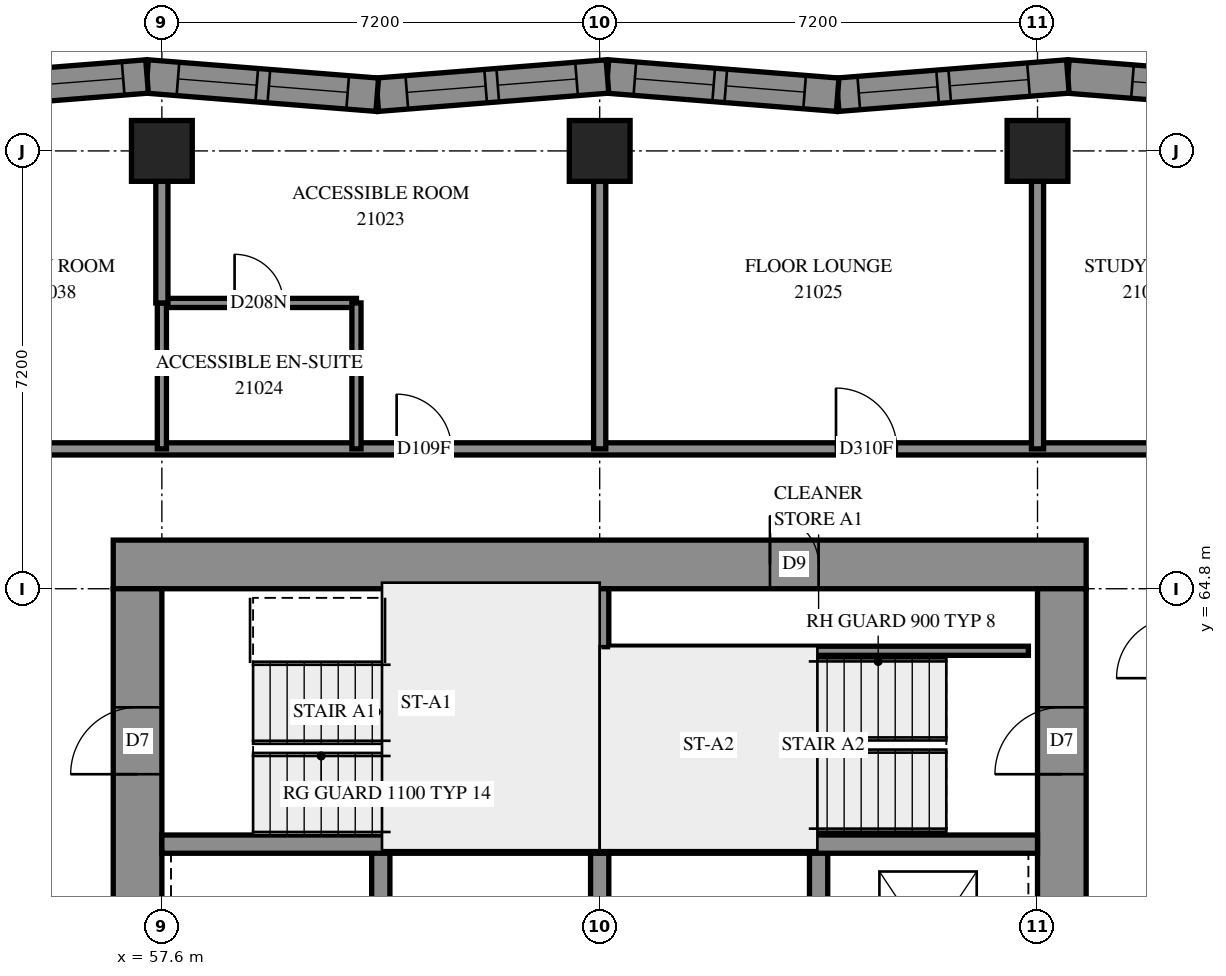
"""IFC4 building model, lengths in metres.
Left out: names, types, materials, properties, quantities, classifications, styles, units other than length and angle.
Written with IfcOpenShell. Run it as: python <this file> out.ifc"""

import sys

from ifc_helpers import new_model, si_unit, direction, frame, frame_2d, origin, origin_2d, place, context, subcontext, project, spatial, polyline, rectangle, outline, extrude, element, fill, save


model = new_model("IFC4")
c1 = context("Model", 3, precision=1e-05, world=origin(), true_north=direction((0.0, 1.0)))
c2 = subcontext(c1, "Body", "Model", "MODEL_VIEW")
j1 = project(units=[si_unit("LENGTHUNIT", "METRE"), si_unit("PLANEANGLEUNIT", "RADIAN")], contexts=[c1])
p1 = place(None, origin())
s1 = spatial("IfcSite", under=j1, at=p1, CompositionType="ELEMENT")
p2 = place(p1, origin())
s2 = spatial("IfcBuilding", under=s1, at=p2, CompositionType="ELEMENT")
p3 = place(p2, frame((0.0, 0.0, 81.2)))
s3 = spatial("IfcBuildingStorey", under=s2, at=p3, CompositionType="ELEMENT", Elevation=81.2)
for number, where, z_axis, x_axis in (
    (1, (57.6, 72.0, 0.0), (0.0, 0.0, 1.0), (1.0, 0.0, 0.0)),
    (2, (64.8, 72.0, 0.0), (0.0, 0.0, 1.0), (1.0, 0.0, 0.0)),
    (3, (72.0, 72.0, 0.0), (0.0, 0.0, 1.0), (1.0, 0.0, 0.0)),
):
    element("IfcColumn", number, at=place(p3, frame(where, z_axis=z_axis, x_axis=x_axis)), inside=s3, PredefinedType="COLUMN", context=c2, shape_type="SweptSolid", body=[
        extrude(rectangle(XDim=1.0, YDim=1.0, at=origin_2d()), origin(), (0.0, 0.0, 1.0), 3.1),
    ])
p4 = place(p3, frame((56.8, 65.2, -0.3), z_axis=(0.0, 0.0, 1.0), x_axis=(1.0, 0.0, 0.0)))
e4 = element("IfcWall", 4, at=p4, inside=s3, PredefinedType="SHEAR", context=c2, shape_type="SweptSolid", body=[
    extrude(rectangle(XDim=16.0, YDim=0.8, at=frame_2d((8.0, 0.0))), origin(), (0.0, 0.0, 1.0), 2.7),
])
p5 = place(p4, frame((10.8, 0.0, 0.3)))
e5 = element("IfcOpeningElement", 5, at=p5, cuts=e4, PredefinedType="OPENING", context=c2, shape_type="SweptSolid", body=[
    extrude(rectangle(XDim=0.8, YDim=2.1, at=frame_2d((0.4, 1.05))), frame((0.0, 0.41, 0.0), z_axis=(0.0, -1.0, 0.0), x_axis=(1.0, 0.0, 0.0)), (0.0, 0.0, 1.0), 0.82),
])
p6 = place(p3, frame((57.2, 50.4, -0.3), z_axis=(0.0, 0.0, 1.0), x_axis=(0.0, 1.0, 0.0)))
e6 = element("IfcWall", 6, at=p6, inside=s3, PredefinedType="SHEAR", context=c2, shape_type="SweptSolid", body=[
    extrude(rectangle(XDim=14.4, YDim=0.8, at=frame_2d((7.2, 0.0))), origin(), (0.0, 0.0, 1.0), 2.7),
])
p7 = place(p6, frame((4.55, 0.0, 0.3)))
e7 = element("IfcOpeningElement", 7, at=p7, cuts=e6, PredefinedType="OPENING", context=c2, shape_type="SweptSolid", body=[
    extrude(rectangle(XDim=1.1, YDim=2.1, at=frame_2d((0.55, 1.05))), frame((0.0, 0.41, 0.0), z_axis=(0.0, -1.0, 0.0), x_axis=(1.0, 0.0, 0.0)), (0.0, 0.0, 1.0), 0.82),
])
p8 = place(p6, frame((11.35, 0.0, 0.3)))
e8 = element("IfcOpeningElement", 8, at=p8, cuts=e6, PredefinedType="OPENING", context=c2, shape_type="SweptSolid", body=[
    extrude(rectangle(XDim=1.1, YDim=2.1, at=frame_2d((0.55, 1.05))), frame((0.0, 0.41, 0.0), z_axis=(0.0, -1.0, 0.0), x_axis=(1.0, 0.0, 0.0)), (0.0, 0.0, 1.0), 0.82),
])
p9 = place(p3, frame((72.4, 50.4, -0.3), z_axis=(0.0, 0.0, 1.0), x_axis=(0.0, 1.0, 0.0)))
e9 = element("IfcWall", 9, at=p9, inside=s3, PredefinedType="SHEAR", context=c2, shape_type="SweptSolid", body=[
    extrude(rectangle(XDim=14.4, YDim=0.8, at=frame_2d((7.2, 0.0))), origin(), (0.0, 0.0, 1.0), 2.7),
])
p10 = place(p9, frame((4.55, 0.0, 0.3)))
e10 = element("IfcOpeningElement", 10, at=p10, cuts=e9, PredefinedType="OPENING", context=c2, shape_type="SweptSolid", body=[
    extrude(rectangle(XDim=1.1, YDim=2.1, at=frame_2d((0.55, 1.05))), frame((0.0, 0.41, 0.0), z_axis=(0.0, -1.0, 0.0), x_axis=(1.0, 0.0, 0.0)), (0.0, 0.0, 1.0), 0.82),
])
p11 = place(p9, frame((11.35, 0.0, 0.3)))
e11 = element("IfcOpeningElement", 11, at=p11, cuts=e9, PredefinedType="OPENING", context=c2, shape_type="SweptSolid", body=[
    extrude(rectangle(XDim=1.1, YDim=2.1, at=frame_2d((0.55, 1.05))), frame((0.0, 0.41, 0.0), z_axis=(0.0, -1.0, 0.0), x_axis=(1.0, 0.0, 0.0)), (0.0, 0.0, 1.0), 0.82),
])
for number, where, z_axis, x_axis in (
    (12, (61.2, 57.3, 0.0), (0.0, 0.0, 1.0), (0.0, 1.0, 0.0)),
    (13, (64.8, 57.3, 0.0), (0.0, 0.0, 1.0), (0.0, 1.0, 0.0)),
    (14, (68.4, 57.3, 0.0), (0.0, 0.0, 1.0), (0.0, 1.0, 0.0)),
):
    element("IfcWall", number, at=place(p3, frame(where, z_axis=z_axis, x_axis=x_axis)), inside=s3, PredefinedType="SOLIDWALL", context=c2, shape_type="SweptSolid", body=[
        extrude(rectangle(XDim=3.3, YDim=0.3, at=frame_2d((1.65, 0.0))), origin(), (0.0, 0.0, 1.0), 3.1),
    ])
for number, where, z_axis, x_axis in (
    (15, (57.6, 60.6, 0.0), (0.0, 0.0, 1.0), (1.0, 0.0, 0.0)),
    (16, (64.8, 60.6, 0.0), (0.0, 0.0, 1.0), (1.0, 0.0, 0.0)),
):
    element("IfcWall", number, at=place(p3, frame(where, z_axis=z_axis, x_axis=x_axis)), inside=s3, PredefinedType="SOLIDWALL", context=c2, shape_type="SweptSolid", body=[
        extrude(rectangle(XDim=7.2, YDim=0.3, at=frame_2d((3.6, 0.0))), origin(), (0.0, 0.0, 1.0), 3.1),
    ])
p12 = place(p3, frame((64.8, 60.6, 0.0), z_axis=(0.0, 0.0, 1.0), x_axis=(0.0, 1.0, 0.0)))
e17 = element("IfcWall", 17, at=p12, inside=s3, PredefinedType="SOLIDWALL", context=c2, shape_type="SweptSolid", body=[
    extrude(rectangle(XDim=4.2, YDim=0.3, at=frame_2d((2.1, 0.0))), origin(), (0.0, 0.0, 1.0), 3.1),
])
p13 = place(p3, frame((76.306, 72.922, 0.0), z_axis=(0.0, 0.0, 1.0), x_axis=(-0.9968745318, 0.0790010628, 0.0)))
e18 = element("IfcWall", 18, at=p13, inside=s3, PredefinedType="SOLIDWALL", context=c2, shape_type="SweptSolid", body=[
    extrude(outline(polyline([(0.043, -0.275), (3.841, -0.275), (3.797, 0.275), (-0.043, 0.275), (0.043, -0.275)])), origin(), (0.0, 0.0, 1.0), 3.1),
])
p14 = place(p13, frame((1.553, 0.0, 0.5)))
e19 = element("IfcOpeningElement", 19, at=p14, cuts=e18, PredefinedType="OPENING", context=c2, shape_type="SweptSolid", body=[
    extrude(rectangle(XDim=1.2, YDim=2.45, at=frame_2d((0.6, 1.225))), frame((0.0, 0.285, 0.0), z_axis=(0.0, -1.0, 0.0), x_axis=(1.0, 0.0, 0.0)), (0.0, 0.0, 1.0), 0.57),
])
p15 = place(p3, frame((72.499, 73.224, 0.0), z_axis=(0.0, 0.0, 1.0), x_axis=(-0.9968747806, -0.0789979222, 0.0)))
e20 = element("IfcWall", 20, at=p15, inside=s3, PredefinedType="SOLIDWALL", context=c2, shape_type="SweptSolid", body=[
    extrude(outline(polyline([(-0.022, -0.275), (3.776, -0.275), (3.819, 0.275), (0.022, 0.275), (-0.022, -0.275)])), origin(), (0.0, 0.0, 1.0), 3.1),
])
p16 = place(p15, frame((0.649, 0.0, 0.5)))
e21 = element("IfcOpeningElement", 21, at=p16, cuts=e20, PredefinedType="OPENING", context=c2, shape_type="SweptSolid", body=[
    extrude(rectangle(XDim=1.3, YDim=2.45, at=frame_2d((0.65, 1.225))), frame((0.0, 0.285, 0.0), z_axis=(0.0, -1.0, 0.0), x_axis=(1.0, 0.0, 0.0)), (0.0, 0.0, 1.0), 0.57),
])
p17 = place(p15, frame((2.149, 0.0, 0.5)))
e22 = element("IfcOpeningElement", 22, at=p17, cuts=e20, PredefinedType="OPENING", context=c2, shape_type="SweptSolid", body=[
    extrude(rectangle(XDim=1.3, YDim=2.45, at=frame_2d((0.65, 1.225))), frame((0.0, 0.285, 0.0), z_axis=(0.0, -1.0, 0.0), x_axis=(1.0, 0.0, 0.0)), (0.0, 0.0, 1.0), 0.57),
])
p18 = place(p3, frame((68.713, 72.924, 0.0), z_axis=(0.0, 0.0, 1.0), x_axis=(-0.9968746163, 0.078999996, 0.0)))
e23 = element("IfcWall", 23, at=p18, inside=s3, PredefinedType="SOLIDWALL", context=c2, shape_type="SweptSolid", body=[
    extrude(outline(polyline([(0.022, -0.275), (3.819, -0.275), (3.776, 0.275), (-0.022, 0.275), (0.022, -0.275)])), origin(), (0.0, 0.0, 1.0), 3.1),
])
p19 = place(p18, frame((0.545, 0.0, 0.5)))
e24 = element("IfcOpeningElement", 24, at=p19, cuts=e23, PredefinedType="OPENING", context=c2, shape_type="SweptSolid", body=[
    extrude(rectangle(XDim=1.3, YDim=2.45, at=frame_2d((0.65, 1.225))), frame((0.0, 0.285, 0.0), z_axis=(0.0, -1.0, 0.0), x_axis=(1.0, 0.0, 0.0)), (0.0, 0.0, 1.0), 0.57),
])
p20 = place(p18, frame((2.045, 0.0, 0.5)))
e25 = element("IfcOpeningElement", 25, at=p20, cuts=e23, PredefinedType="OPENING", context=c2, shape_type="SweptSolid", body=[
    extrude(rectangle(XDim=1.3, YDim=2.45, at=frame_2d((0.65, 1.225))), frame((0.0, 0.285, 0.0), z_axis=(0.0, -1.0, 0.0), x_axis=(1.0, 0.0, 0.0)), (0.0, 0.0, 1.0), 0.57),
])
p21 = place(p3, frame((64.927, 73.224, 0.0), z_axis=(0.0, 0.0, 1.0), x_axis=(-0.9968746163, -0.078999996, 0.0)))
e26 = element("IfcWall", 26, at=p21, inside=s3, PredefinedType="SOLIDWALL", context=c2, shape_type="SweptSolid", body=[
    extrude(outline(polyline([(-0.022, -0.275), (3.776, -0.275), (3.819, 0.275), (0.022, 0.275), (-0.022, -0.275)])), origin(), (0.0, 0.0, 1.0), 3.1),
])
p22 = place(p21, frame((0.51, 0.0, 0.5)))
e27 = element("IfcOpeningElement", 27, at=p22, cuts=e26, PredefinedType="OPENING", context=c2, shape_type="SweptSolid", body=[
    extrude(rectangle(XDim=1.3, YDim=2.45, at=frame_2d((0.65, 1.225))), frame((0.0, 0.285, 0.0), z_axis=(0.0, -1.0, 0.0), x_axis=(1.0, 0.0, 0.0)), (0.0, 0.0, 1.0), 0.57),
])
p23 = place(p21, frame((2.01, 0.0, 0.5)))
e28 = element("IfcOpeningElement", 28, at=p23, cuts=e26, PredefinedType="OPENING", context=c2, shape_type="SweptSolid", body=[
    extrude(rectangle(XDim=1.3, YDim=2.45, at=frame_2d((0.65, 1.225))), frame((0.0, 0.285, 0.0), z_axis=(0.0, -1.0, 0.0), x_axis=(1.0, 0.0, 0.0)), (0.0, 0.0, 1.0), 0.57),
])
p24 = place(p3, frame((61.142, 72.924, 0.0), z_axis=(0.0, 0.0, 1.0), x_axis=(-0.9968746163, 0.078999996, 0.0)))
e29 = element("IfcWall", 29, at=p24, inside=s3, PredefinedType="SOLIDWALL", context=c2, shape_type="SweptSolid", body=[
    extrude(outline(polyline([(0.022, -0.275), (3.819, -0.275), (3.776, 0.275), (-0.022, 0.275), (0.022, -0.275)])), origin(), (0.0, 0.0, 1.0), 3.1),
])
p25 = place(p24, frame((0.488, 0.0, 0.5)))
e30 = element("IfcOpeningElement", 30, at=p25, cuts=e29, PredefinedType="OPENING", context=c2, shape_type="SweptSolid", body=[
    extrude(rectangle(XDim=1.3, YDim=2.45, at=frame_2d((0.65, 1.225))), frame((0.0, 0.285, 0.0), z_axis=(0.0, -1.0, 0.0), x_axis=(1.0, 0.0, 0.0)), (0.0, 0.0, 1.0), 0.57),
])
p26 = place(p24, frame((1.988, 0.0, 0.5)))
e31 = element("IfcOpeningElement", 31, at=p26, cuts=e29, PredefinedType="OPENING", context=c2, shape_type="SweptSolid", body=[
    extrude(rectangle(XDim=1.3, YDim=2.45, at=frame_2d((0.65, 1.225))), frame((0.0, 0.285, 0.0), z_axis=(0.0, -1.0, 0.0), x_axis=(1.0, 0.0, 0.0)), (0.0, 0.0, 1.0), 0.57),
])
p27 = place(p3, frame((57.356, 73.224, 0.0), z_axis=(0.0, 0.0, 1.0), x_axis=(-0.9968746163, -0.078999996, 0.0)))
e32 = element("IfcWall", 32, at=p27, inside=s3, PredefinedType="SOLIDWALL", context=c2, shape_type="SweptSolid", body=[
    extrude(outline(polyline([(-0.022, -0.275), (3.776, -0.275), (3.819, 0.275), (0.022, 0.275), (-0.022, -0.275)])), origin(), (0.0, 0.0, 1.0), 3.1),
])
p28 = place(p27, frame((0.394, 0.0, 0.5)))
e33 = element("IfcOpeningElement", 33, at=p28, cuts=e32, PredefinedType="OPENING", context=c2, shape_type="SweptSolid", body=[
    extrude(rectangle(XDim=1.3, YDim=2.45, at=frame_2d((0.65, 1.225))), frame((0.0, 0.285, 0.0), z_axis=(0.0, -1.0, 0.0), x_axis=(1.0, 0.0, 0.0)), (0.0, 0.0, 1.0), 0.57),
])
p29 = place(p27, frame((1.894, 0.0, 0.5)))
e34 = element("IfcOpeningElement", 34, at=p29, cuts=e32, PredefinedType="OPENING", context=c2, shape_type="SweptSolid", body=[
    extrude(rectangle(XDim=1.3, YDim=2.45, at=frame_2d((0.65, 1.225))), frame((0.0, 0.285, 0.0), z_axis=(0.0, -1.0, 0.0), x_axis=(1.0, 0.0, 0.0)), (0.0, 0.0, 1.0), 0.57),
])
p30 = place(p3, frame((64.95, 63.78, 0.0), z_axis=(0.0, 0.0, 1.0), x_axis=(1.0, 0.0, 0.0)))
e35 = element("IfcWall", 35, at=p30, inside=s3, PredefinedType="PARTITIONING", context=c2, shape_type="SweptSolid", body=[
    extrude(rectangle(XDim=6.9, YDim=0.15, at=frame_2d((3.45, 0.0))), origin(), (0.0, 0.0, 1.0), 3.1),
])
p31 = place(p3, frame((55.3, 67.1, 0.0), z_axis=(0.0, 0.0, 1.0), x_axis=(1.0, 0.0, 0.0)))
e36 = element("IfcWall", 36, at=p31, inside=s3, PredefinedType="PARTITIONING", context=c2, shape_type="SweptSolid", body=[
    extrude(rectangle(XDim=19.0, YDim=0.2, at=frame_2d((9.5, 0.0))), origin(), (0.0, 0.0, 1.0), 3.1),
])
p32 = place(p31, frame((6.161, 0.0, 0.0)))
e37 = element("IfcOpeningElement", 37, at=p32, cuts=e36, PredefinedType="OPENING", context=c2, shape_type="SweptSolid", body=[
    extrude(rectangle(XDim=0.9, YDim=2.1, at=frame_2d((0.45, 1.05))), frame((0.0, 0.11, 0.0), z_axis=(0.0, -1.0, 0.0), x_axis=(1.0, 0.0, 0.0)), (0.0, 0.0, 1.0), 0.22),
])
p33 = place(p31, frame((13.386, 0.0, 0.0)))
e38 = element("IfcOpeningElement", 38, at=p33, cuts=e36, PredefinedType="OPENING", context=c2, shape_type="SweptSolid", body=[
    extrude(rectangle(XDim=1.0, YDim=2.1, at=frame_2d((0.5, 1.05))), frame((0.0, 0.11, 0.0), z_axis=(0.0, -1.0, 0.0), x_axis=(1.0, 0.0, 0.0)), (0.0, 0.0, 1.0), 0.22),
])
for number, where, z_axis, x_axis in (
    (39, (64.8, 67.1, 0.0), (0.0, 0.0, 1.0), (0.0, 1.0, 0.0)),
    (40, (72.0, 67.1, 0.0), (0.0, 0.0, 1.0), (0.0, 1.0, 0.0)),
):
    element("IfcWall", number, at=place(p3, frame(where, z_axis=z_axis, x_axis=x_axis)), inside=s3, PredefinedType="PARTITIONING", context=c2, shape_type="SweptSolid", body=[
        extrude(rectangle(XDim=4.4, YDim=0.2, at=frame_2d((2.2, 0.0))), origin(), (0.0, 0.0, 1.0), 3.1),
    ])
p34 = place(p3, frame((57.6, 69.5, 0.0), z_axis=(0.0, 0.0, 1.0), x_axis=(1.0, 0.0, 0.0)))
e41 = element("IfcWall", 41, at=p34, inside=s3, PredefinedType="PARTITIONING", context=c2, shape_type="SweptSolid", body=[
    extrude(rectangle(XDim=3.2, YDim=0.15, at=frame_2d((1.6, 0.0))), origin(), (0.0, 0.0, 1.0), 3.1),
])
p35 = place(p34, frame((1.196, 0.0, 0.0)))
e42 = element("IfcOpeningElement", 42, at=p35, cuts=e41, PredefinedType="OPENING", context=c2, shape_type="SweptSolid", body=[
    extrude(rectangle(XDim=0.8, YDim=2.1, at=frame_2d((0.4, 1.05))), frame((0.0, 0.085, 0.0), z_axis=(0.0, -1.0, 0.0), x_axis=(1.0, 0.0, 0.0)), (0.0, 0.0, 1.0), 0.17),
])
for number, where, z_axis, x_axis in (
    (43, (57.6, 67.1, 0.0), (0.0, 0.0, 1.0), (0.0, 1.0, 0.0)),
    (44, (60.8, 67.1, 0.0), (0.0, 0.0, 1.0), (0.0, 1.0, 0.0)),
):
    element("IfcWall", number, at=place(p3, frame(where, z_axis=z_axis, x_axis=x_axis)), inside=s3, PredefinedType="PARTITIONING", context=c2, shape_type="SweptSolid", body=[
        extrude(rectangle(XDim=2.4, YDim=0.15, at=frame_2d((1.2, 0.0))), origin(), (0.0, 0.0, 1.0), 3.1),
    ])
p36 = place(p3, frame((57.6, 69.5, 0.0), z_axis=(0.0, 0.0, 1.0), x_axis=(0.0, 1.0, 0.0)))
e45 = element("IfcWall", 45, at=p36, inside=s3, PredefinedType="PARTITIONING", context=c2, shape_type="SweptSolid", body=[
    extrude(rectangle(XDim=2.0, YDim=0.2, at=frame_2d((1.0, 0.0))), origin(), (0.0, 0.0, 1.0), 3.1),
])
p37 = place(p14, origin())
e46 = element("IfcWindow", 46, at=p37, inside=s3, PartitioningType="SINGLE_PANEL", PredefinedType="WINDOW", context=c2, shape_type="SweptSolid", body=[
    extrude(rectangle(XDim=1.2, YDim=2.45, at=frame_2d((0.6, 1.225))), frame((0.0, 0.155, 0.0), z_axis=(0.0, -1.0, 0.0), x_axis=(1.0, 0.0, 0.0)), (0.0, 0.0, 1.0), 0.06),
])
fill(e19, e46)
p38 = place(p16, origin())
e47 = element("IfcWindow", 47, at=p38, inside=s3, PartitioningType="SINGLE_PANEL", PredefinedType="WINDOW", context=c2, shape_type="SweptSolid", body=[
    extrude(rectangle(XDim=1.3, YDim=2.45, at=frame_2d((0.65, 1.225))), frame((0.0, 0.155, 0.0), z_axis=(0.0, -1.0, 0.0), x_axis=(1.0, 0.0, 0.0)), (0.0, 0.0, 1.0), 0.06),
])
fill(e21, e47)
p39 = place(p17, origin())
e48 = element("IfcWindow", 48, at=p39, inside=s3, PartitioningType="SINGLE_PANEL", PredefinedType="WINDOW", context=c2, shape_type="SweptSolid", body=[
    extrude(rectangle(XDim=1.3, YDim=2.45, at=frame_2d((0.65, 1.225))), frame((0.0, 0.155, 0.0), z_axis=(0.0, -1.0, 0.0), x_axis=(1.0, 0.0, 0.0)), (0.0, 0.0, 1.0), 0.06),
])
fill(e22, e48)
p40 = place(p19, origin())
e49 = element("IfcWindow", 49, at=p40, inside=s3, PartitioningType="SINGLE_PANEL", PredefinedType="WINDOW", context=c2, shape_type="SweptSolid", body=[
    extrude(rectangle(XDim=1.3, YDim=2.45, at=frame_2d((0.65, 1.225))), frame((0.0, 0.155, 0.0), z_axis=(0.0, -1.0, 0.0), x_axis=(1.0, 0.0, 0.0)), (0.0, 0.0, 1.0), 0.06),
])
fill(e24, e49)
p41 = place(p20, origin())
e50 = element("IfcWindow", 50, at=p41, inside=s3, PartitioningType="SINGLE_PANEL", PredefinedType="WINDOW", context=c2, shape_type="SweptSolid", body=[
    extrude(rectangle(XDim=1.3, YDim=2.45, at=frame_2d((0.65, 1.225))), frame((0.0, 0.155, 0.0), z_axis=(0.0, -1.0, 0.0), x_axis=(1.0, 0.0, 0.0)), (0.0, 0.0, 1.0), 0.06),
])
fill(e25, e50)
p42 = place(p22, origin())
e51 = element("IfcWindow", 51, at=p42, inside=s3, PartitioningType="SINGLE_PANEL", PredefinedType="WINDOW", context=c2, shape_type="SweptSolid", body=[
    extrude(rectangle(XDim=1.3, YDim=2.45, at=frame_2d((0.65, 1.225))), frame((0.0, 0.155, 0.0), z_axis=(0.0, -1.0, 0.0), x_axis=(1.0, 0.0, 0.0)), (0.0, 0.0, 1.0), 0.06),
])
fill(e27, e51)
p43 = place(p23, origin())
e52 = element("IfcWindow", 52, at=p43, inside=s3, PartitioningType="SINGLE_PANEL", PredefinedType="WINDOW", context=c2, shape_type="SweptSolid", body=[
    extrude(rectangle(XDim=1.3, YDim=2.45, at=frame_2d((0.65, 1.225))), frame((0.0, 0.155, 0.0), z_axis=(0.0, -1.0, 0.0), x_axis=(1.0, 0.0, 0.0)), (0.0, 0.0, 1.0), 0.06),
])
fill(e28, e52)
p44 = place(p25, origin())
e53 = element("IfcWindow", 53, at=p44, inside=s3, PartitioningType="SINGLE_PANEL", PredefinedType="WINDOW", context=c2, shape_type="SweptSolid", body=[
    extrude(rectangle(XDim=1.3, YDim=2.45, at=frame_2d((0.65, 1.225))), frame((0.0, 0.155, 0.0), z_axis=(0.0, -1.0, 0.0), x_axis=(1.0, 0.0, 0.0)), (0.0, 0.0, 1.0), 0.06),
])
fill(e30, e53)
p45 = place(p26, origin())
e54 = element("IfcWindow", 54, at=p45, inside=s3, PartitioningType="SINGLE_PANEL", PredefinedType="WINDOW", context=c2, shape_type="SweptSolid", body=[
    extrude(rectangle(XDim=1.3, YDim=2.45, at=frame_2d((0.65, 1.225))), frame((0.0, 0.155, 0.0), z_axis=(0.0, -1.0, 0.0), x_axis=(1.0, 0.0, 0.0)), (0.0, 0.0, 1.0), 0.06),
])
fill(e31, e54)
p46 = place(p28, origin())
e55 = element("IfcWindow", 55, at=p46, inside=s3, PartitioningType="SINGLE_PANEL", PredefinedType="WINDOW", context=c2, shape_type="SweptSolid", body=[
    extrude(rectangle(XDim=1.3, YDim=2.45, at=frame_2d((0.65, 1.225))), frame((0.0, 0.155, 0.0), z_axis=(0.0, -1.0, 0.0), x_axis=(1.0, 0.0, 0.0)), (0.0, 0.0, 1.0), 0.06),
])
fill(e33, e55)
p47 = place(p5, origin())
e56 = element("IfcDoor", 56, at=p47, inside=s3, OperationType="SINGLE_SWING_RIGHT", PredefinedType="DOOR", context=c2, shape_type="SweptSolid", body=[
    extrude(rectangle(XDim=0.8, YDim=2.1, at=frame_2d((0.4, 1.05))), frame((0.0, -0.34, 0.0), z_axis=(0.0, -1.0, 0.0), x_axis=(1.0, 0.0, 0.0)), (0.0, 0.0, 1.0), 0.05),
])
fill(e5, e56)
p48 = place(p8, origin())
e57 = element("IfcDoor", 57, at=p48, inside=s3, OperationType="SINGLE_SWING_LEFT", PredefinedType="DOOR", context=c2, shape_type="SweptSolid", body=[
    extrude(rectangle(XDim=1.1, YDim=2.1, at=frame_2d((0.55, 1.05))), frame((0.0, 0.025, 0.0), z_axis=(0.0, -1.0, 0.0), x_axis=(1.0, 0.0, 0.0)), (0.0, 0.0, 1.0), 0.05),
])
fill(e8, e57)
p49 = place(p11, origin())
e58 = element("IfcDoor", 58, at=p49, inside=s3, OperationType="SINGLE_SWING_RIGHT", PredefinedType="DOOR", context=c2, shape_type="SweptSolid", body=[
    extrude(rectangle(XDim=1.1, YDim=2.1, at=frame_2d((0.55, 1.05))), frame((0.0, 0.025, 0.0), z_axis=(0.0, -1.0, 0.0), x_axis=(1.0, 0.0, 0.0)), (0.0, 0.0, 1.0), 0.05),
])
fill(e11, e58)
p50 = place(p32, origin())
e59 = element("IfcDoor", 59, at=p50, inside=s3, OperationType="SINGLE_SWING_RIGHT", PredefinedType="DOOR", context=c2, shape_type="SweptSolid", body=[
    extrude(rectangle(XDim=0.9, YDim=2.1, at=frame_2d((0.45, 1.05))), frame((0.0, 0.025, 0.0), z_axis=(0.0, -1.0, 0.0), x_axis=(1.0, 0.0, 0.0)), (0.0, 0.0, 1.0), 0.05),
])
fill(e37, e59)
p51 = place(p35, origin())
e60 = element("IfcDoor", 60, at=p51, inside=s3, OperationType="SINGLE_SWING_RIGHT", PredefinedType="DOOR", context=c2, shape_type="SweptSolid", body=[
    extrude(rectangle(XDim=0.8, YDim=2.1, at=frame_2d((0.4, 1.05))), frame((0.0, 0.025, 0.0), z_axis=(0.0, -1.0, 0.0), x_axis=(1.0, 0.0, 0.0)), (0.0, 0.0, 1.0), 0.05),
])
fill(e42, e60)
p52 = place(p33, origin())
e61 = element("IfcDoor", 61, at=p52, inside=s3, OperationType="SINGLE_SWING_RIGHT", PredefinedType="DOOR", context=c2, shape_type="SweptSolid", body=[
    extrude(rectangle(XDim=1.0, YDim=2.1, at=frame_2d((0.5, 1.05))), frame((0.0, 0.025, 0.0), z_axis=(0.0, -1.0, 0.0), x_axis=(1.0, 0.0, 0.0)), (0.0, 0.0, 1.0), 0.05),
])
fill(e38, e61)
save(model, sys.argv[1])
